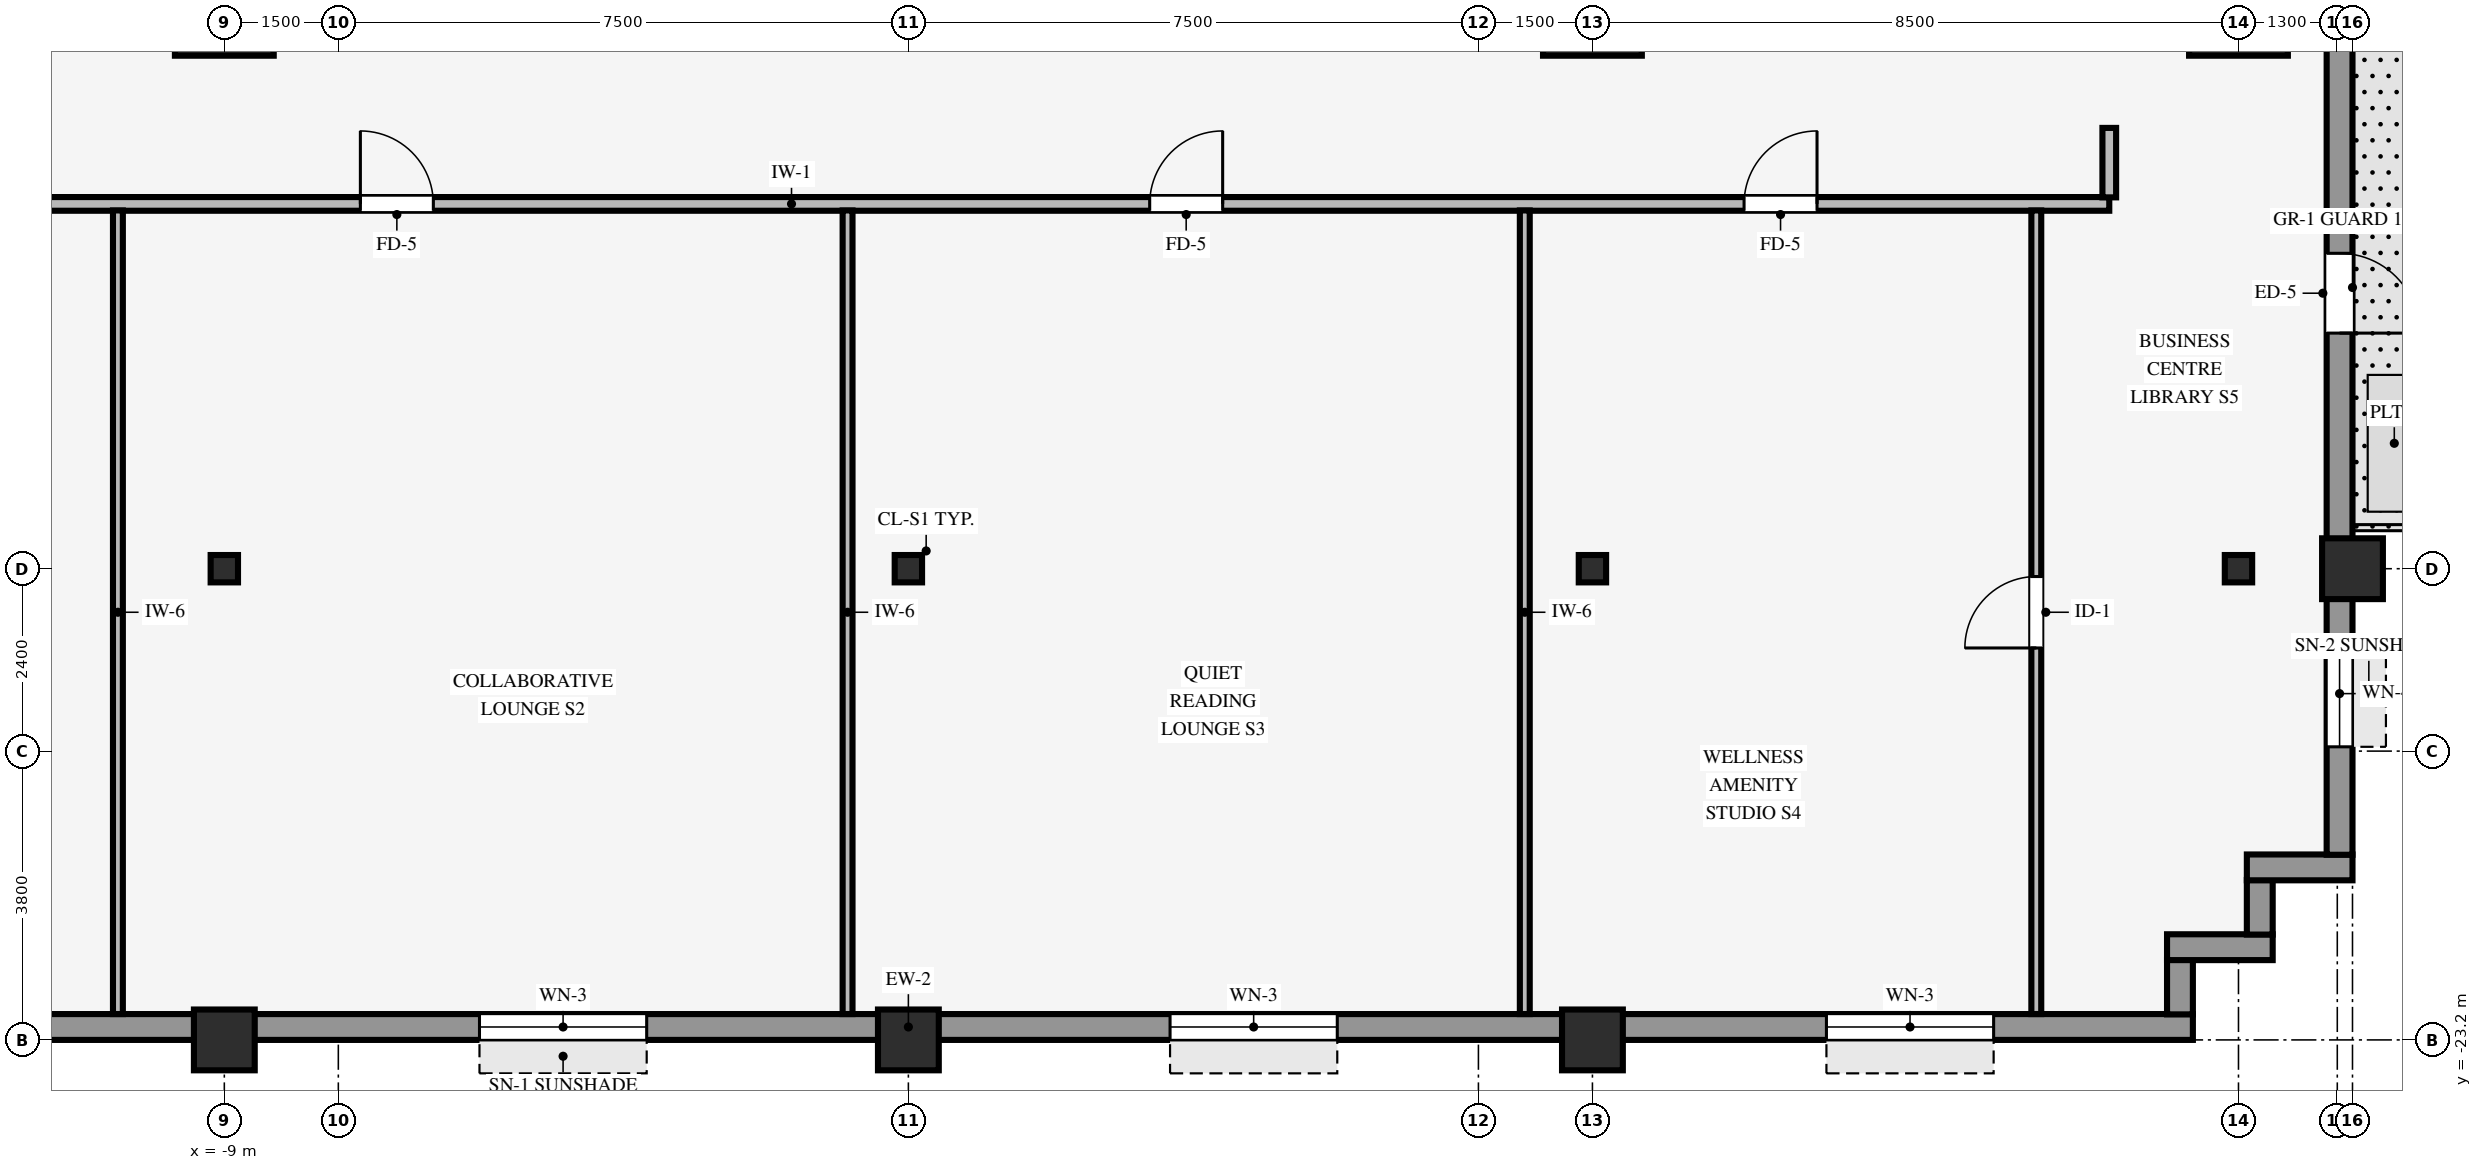
"""IFC4 building model, lengths in metres.
Left out: names, types, materials, properties, quantities, classifications, styles, units other than length and angle.
Written with IfcOpenShell. Run it as: python <this file> out.ifc"""

import sys

from ifc_helpers import new_model, si_unit, direction, frame, frame_2d, origin, origin_2d, place, context, subcontext, project, spatial, rectangle, hollow_rectangle, i_section, extrude, source, transform, mapped, element, fill, save


model = new_model("IFC4")
c1 = context("Model", 3, precision=1e-05, world=origin(), true_north=direction((0.0, 1.0)))
c2 = subcontext(c1, "Body", "Model", "MODEL_VIEW")
j1 = project(units=[si_unit("LENGTHUNIT", "METRE"), si_unit("PLANEANGLEUNIT", "RADIAN")], contexts=[c1])
p1 = place(None, origin())
s1 = spatial("IfcSite", under=j1, at=p1, CompositionType="ELEMENT")
p2 = place(p1, origin())
s2 = spatial("IfcBuilding", under=s1, at=p2, CompositionType="ELEMENT")
p3 = place(p2, frame((0.0, 0.0, 42.2)))
s3 = spatial("IfcBuildingStorey", under=s2, at=p3, CompositionType="ELEMENT", Elevation=42.2)
for number, where, z_axis, x_axis in (
    (1, (-9.0, -9.6, 0.0), (0.0, 0.0, 1.0), (1.0, 0.0, 0.0)),
    (2, (9.0, -9.6, 0.0), (0.0, 0.0, 1.0), (1.0, 0.0, 0.0)),
    (3, (17.5, -9.6, 0.0), (0.0, 0.0, 1.0), (1.0, 0.0, 0.0)),
):
    element("IfcColumn", number, at=place(p3, frame(where, z_axis=z_axis, x_axis=x_axis)), inside=s3, PredefinedType="COLUMN", context=c2, shape_type="SweptSolid", body=[
        extrude(rectangle(XDim=1.3, YDim=1.3, at=origin_2d()), origin(), (0.0, 0.0, 1.0), 3.37),
    ])
for number, where, z_axis, x_axis in (
    (4, (19.0, -17.0, 0.0), (0.0, 0.0, 1.0), (1.0, 0.0, 0.0)),
    (5, (-9.0, -23.2, 0.0), (0.0, 0.0, 1.0), (1.0, 0.0, 0.0)),
    (6, (0.0, -23.2, 0.0), (0.0, 0.0, 1.0), (1.0, 0.0, 0.0)),
    (7, (9.0, -23.2, 0.0), (0.0, 0.0, 1.0), (1.0, 0.0, 0.0)),
):
    element("IfcColumn", number, at=place(p3, frame(where, z_axis=z_axis, x_axis=x_axis)), inside=s3, PredefinedType="COLUMN", context=c2, shape_type="SweptSolid", body=[
        extrude(hollow_rectangle(XDim=0.8, YDim=0.8, WallThickness=0.055, InnerFilletRadius=0.055, OuterFilletRadius=0.11, at=origin_2d()), origin(), (0.0, 0.0, 1.0), 3.37),
    ])
for number, where, z_axis, x_axis in (
    (8, (0.0, -17.0, 0.0), (0.0, 0.0, 1.0), (1.0, 0.0, 0.0)),
    (9, (-9.0, -17.0, 0.0), (0.0, 0.0, 1.0), (1.0, 0.0, 0.0)),
    (10, (9.0, -17.0, 0.0), (0.0, 0.0, 1.0), (1.0, 0.0, 0.0)),
    (11, (17.5, -17.0, 0.0), (0.0, 0.0, 1.0), (1.0, 0.0, 0.0)),
):
    element("IfcColumn", number, at=place(p3, frame(where, z_axis=z_axis, x_axis=x_axis)), inside=s3, PredefinedType="COLUMN", context=c2, shape_type="SweptSolid", body=[
        extrude(i_section(OverallWidth=0.36, OverallDepth=0.36, WebThickness=0.021, FlangeThickness=0.021, FilletRadius=0.018, at=origin_2d()), origin(), (0.0, 0.0, 1.0), 3.37),
    ])
p4 = place(p3, frame((-16.9, -23.03, 0.0), z_axis=(0.0, 0.0, 1.0), x_axis=(1.0, 0.0, 0.0)))
e12 = element("IfcWall", 12, at=p4, inside=s3, PredefinedType="STANDARD", context=c2, shape_type="SweptSolid", body=[
    extrude(rectangle(XDim=33.8, YDim=0.34, at=frame_2d((16.9, 0.0))), origin(), (0.0, 0.0, 1.0), 2.705),
])
p5 = place(p4, frame((2.171, 0.0, 0.8)))
e13 = element("IfcOpeningElement", 13, at=p5, cuts=e12, PredefinedType="OPENING", context=c2, shape_type="SweptSolid", body=[
    extrude(rectangle(XDim=2.2, YDim=1.65, at=frame_2d((1.1, 0.825))), frame((0.0, 0.18, 0.0), z_axis=(0.0, -1.0, 0.0), x_axis=(1.0, 0.0, 0.0)), (0.0, 0.0, 1.0), 0.36),
])
p6 = place(p4, frame((11.257, 0.0, 0.8)))
e14 = element("IfcOpeningElement", 14, at=p6, cuts=e12, PredefinedType="OPENING", context=c2, shape_type="SweptSolid", body=[
    extrude(rectangle(XDim=2.2, YDim=1.65, at=frame_2d((1.1, 0.825))), frame((0.0, 0.18, 0.0), z_axis=(0.0, -1.0, 0.0), x_axis=(1.0, 0.0, 0.0)), (0.0, 0.0, 1.0), 0.36),
])
p7 = place(p4, frame((20.343, 0.0, 0.8)))
e15 = element("IfcOpeningElement", 15, at=p7, cuts=e12, PredefinedType="OPENING", context=c2, shape_type="SweptSolid", body=[
    extrude(rectangle(XDim=2.2, YDim=1.65, at=frame_2d((1.1, 0.825))), frame((0.0, 0.18, 0.0), z_axis=(0.0, -1.0, 0.0), x_axis=(1.0, 0.0, 0.0)), (0.0, 0.0, 1.0), 0.36),
])
p8 = place(p4, frame((28.979, 0.0, 0.8)))
e16 = element("IfcOpeningElement", 16, at=p8, cuts=e12, PredefinedType="OPENING", context=c2, shape_type="SweptSolid", body=[
    extrude(rectangle(XDim=2.2, YDim=1.65, at=frame_2d((1.1, 0.825))), frame((0.0, 0.18, 0.0), z_axis=(0.0, -1.0, 0.0), x_axis=(1.0, 0.0, 0.0)), (0.0, 0.0, 1.0), 0.36),
])
p9 = place(p3, frame((16.73, -22.864, 0.0), z_axis=(0.0, 0.0, 1.0), x_axis=(0.0, 1.0, 0.0)))
e17 = element("IfcWall", 17, at=p9, inside=s3, PredefinedType="STANDARD", context=c2, shape_type="SweptSolid", body=[
    extrude(rectangle(XDim=0.718, YDim=0.34, at=frame_2d((0.359, 0.0))), origin(), (0.0, 0.0, 1.0), 3.36),
])
p10 = place(p3, frame((16.56, -21.98, 0.0), z_axis=(0.0, 0.0, 1.0), x_axis=(1.0, 0.0, 0.0)))
e18 = element("IfcWall", 18, at=p10, inside=s3, PredefinedType="STANDARD", context=c2, shape_type="SweptSolid", body=[
    extrude(rectangle(XDim=1.39, YDim=0.34, at=frame_2d((0.695, 0.0))), origin(), (0.0, 0.0, 1.0), 3.36),
])
p11 = place(p3, frame((17.78, -21.814, 0.0), z_axis=(0.0, 0.0, 1.0), x_axis=(0.0, 1.0, 0.0)))
e19 = element("IfcWall", 19, at=p11, inside=s3, PredefinedType="STANDARD", context=c2, shape_type="SweptSolid", body=[
    extrude(rectangle(XDim=0.718, YDim=0.34, at=frame_2d((0.359, 0.0))), origin(), (0.0, 0.0, 1.0), 3.36),
])
p12 = place(p3, frame((17.61, -20.93, 0.0), z_axis=(0.0, 0.0, 1.0), x_axis=(1.0, 0.0, 0.0)))
e20 = element("IfcWall", 20, at=p12, inside=s3, PredefinedType="STANDARD", context=c2, shape_type="SweptSolid", body=[
    extrude(rectangle(XDim=1.39, YDim=0.34, at=frame_2d((0.695, 0.0))), origin(), (0.0, 0.0, 1.0), 3.36),
])
p13 = place(p3, frame((18.83, -20.764, 0.0), z_axis=(0.0, 0.0, 1.0), x_axis=(0.0, 1.0, 0.0)))
e21 = element("IfcWall", 21, at=p13, inside=s3, PredefinedType="STANDARD", context=c2, shape_type="SweptSolid", body=[
    extrude(rectangle(XDim=41.528, YDim=0.34, at=frame_2d((20.764, 0.0))), origin(), (0.0, 0.0, 1.0), 2.705),
])
p14 = place(p13, frame((7.914, 0.0, 0.0), z_axis=(0.0, 0.0, 1.0), x_axis=(-1.0, 0.0, 0.0)))
e22 = element("IfcOpeningElement", 22, at=p14, cuts=e21, PredefinedType="OPENING", context=c2, shape_type="SweptSolid", body=[
    extrude(rectangle(XDim=1.05, YDim=2.1, at=frame_2d((0.525, 1.05))), frame((0.0, 0.18, 0.0), z_axis=(0.0, -1.0, 0.0), x_axis=(1.0, 0.0, 0.0)), (0.0, 0.0, 1.0), 0.36),
])
p15 = place(p13, frame((1.42, 0.0, 0.8)))
e23 = element("IfcOpeningElement", 23, at=p15, cuts=e21, PredefinedType="OPENING", context=c2, shape_type="SweptSolid", body=[
    extrude(rectangle(XDim=1.4, YDim=1.65, at=frame_2d((0.7, 0.825))), frame((0.0, 0.18, 0.0), z_axis=(0.0, -1.0, 0.0), x_axis=(1.0, 0.0, 0.0)), (0.0, 0.0, 1.0), 0.36),
])
p16 = place(p13, frame((32.417, 0.0, 0.8)))
e24 = element("IfcOpeningElement", 24, at=p16, cuts=e21, PredefinedType="OPENING", context=c2, shape_type="SweptSolid", body=[
    extrude(rectangle(XDim=1.4, YDim=1.65, at=frame_2d((0.7, 0.825))), frame((0.0, 0.18, 0.0), z_axis=(0.0, -1.0, 0.0), x_axis=(1.0, 0.0, 0.0)), (0.0, 0.0, 1.0), 0.36),
])
p17 = place(p13, frame((38.708, 0.0, 0.8)))
e25 = element("IfcOpeningElement", 25, at=p17, cuts=e21, PredefinedType="OPENING", context=c2, shape_type="SweptSolid", body=[
    extrude(rectangle(XDim=1.4, YDim=1.65, at=frame_2d((0.7, 0.825))), frame((0.0, 0.18, 0.0), z_axis=(0.0, -1.0, 0.0), x_axis=(1.0, 0.0, 0.0)), (0.0, 0.0, 1.0), 0.36),
])
p18 = place(p3, frame((-15.8, -12.2, 0.0), z_axis=(0.0, 0.0, 1.0), x_axis=(1.0, 0.0, 0.0)))
e26 = element("IfcWall", 26, at=p18, inside=s3, PredefinedType="PARTITIONING", context=c2, shape_type="SweptSolid", body=[
    extrude(rectangle(XDim=31.6, YDim=0.18, at=frame_2d((15.8, 0.0))), origin(), (0.0, 0.0, 1.0), 3.36),
])
p19 = place(p18, frame((18.975, 0.0, 0.0)))
e27 = element("IfcOpeningElement", 27, at=p19, cuts=e26, PredefinedType="OPENING", context=c2, shape_type="SweptSolid", body=[
    extrude(rectangle(XDim=0.96, YDim=2.1, at=frame_2d((0.48, 1.05))), frame((0.0, 0.1, 0.0), z_axis=(0.0, -1.0, 0.0), x_axis=(1.0, 0.0, 0.0)), (0.0, 0.0, 1.0), 0.2),
])
p20 = place(p18, frame((8.59, 0.0, 0.0)))
e28 = element("IfcOpeningElement", 28, at=p20, cuts=e26, PredefinedType="OPENING", context=c2, shape_type="SweptSolid", body=[
    extrude(rectangle(XDim=0.96, YDim=2.1, at=frame_2d((0.48, 1.05))), frame((0.0, 0.1, 0.0), z_axis=(0.0, -1.0, 0.0), x_axis=(1.0, 0.0, 0.0)), (0.0, 0.0, 1.0), 0.2),
])
p21 = place(p18, frame((26.795, 0.0, 0.0)))
e29 = element("IfcOpeningElement", 29, at=p21, cuts=e26, PredefinedType="OPENING", context=c2, shape_type="SweptSolid", body=[
    extrude(rectangle(XDim=0.96, YDim=2.1, at=frame_2d((0.48, 1.05))), frame((0.0, 0.1, 0.0), z_axis=(0.0, -1.0, 0.0), x_axis=(1.0, 0.0, 0.0)), (0.0, 0.0, 1.0), 0.2),
])
p22 = place(p18, frame((2.29, 0.0, 0.0)))
e30 = element("IfcOpeningElement", 30, at=p22, cuts=e26, PredefinedType="OPENING", context=c2, shape_type="SweptSolid", body=[
    extrude(rectangle(XDim=0.96, YDim=2.1, at=frame_2d((0.48, 1.05))), frame((0.0, 0.1, 0.0), z_axis=(0.0, -1.0, 0.0), x_axis=(1.0, 0.0, 0.0)), (0.0, 0.0, 1.0), 0.2),
])
for number, where, z_axis, x_axis in (
    (31, (-10.4, -22.86, 0.0), (0.0, 0.0, 1.0), (0.0, 1.0, 0.0)),
    (32, (-0.8, -22.86, 0.0), (0.0, 0.0, 1.0), (0.0, 1.0, 0.0)),
    (33, (8.11, -22.86, 0.0), (0.0, 0.0, 1.0), (0.0, 1.0, 0.0)),
):
    element("IfcWall", number, at=place(p3, frame(where, z_axis=z_axis, x_axis=x_axis)), inside=s3, PredefinedType="PARTITIONING", context=c2, shape_type="SweptSolid", body=[
        extrude(rectangle(XDim=10.574, YDim=0.13, at=frame_2d((5.287, 0.0))), origin(), (0.0, 0.0, 1.0), 3.36),
    ])
p23 = place(p3, frame((14.84, -22.86, 0.0), z_axis=(0.0, 0.0, 1.0), x_axis=(0.0, 1.0, 0.0)))
e34 = element("IfcWall", 34, at=p23, inside=s3, PredefinedType="PARTITIONING", context=c2, shape_type="SweptSolid", body=[
    extrude(rectangle(XDim=10.574, YDim=0.13, at=frame_2d((5.287, 0.0))), origin(), (0.0, 0.0, 1.0), 3.36),
])
p24 = place(p23, frame((4.817, 0.0, 0.0)))
e35 = element("IfcOpeningElement", 35, at=p24, cuts=e34, PredefinedType="OPENING", context=c2, shape_type="SweptSolid", body=[
    extrude(rectangle(XDim=0.94, YDim=2.1, at=frame_2d((0.47, 1.05))), frame((0.0, 0.075, 0.0), z_axis=(0.0, -1.0, 0.0), x_axis=(1.0, 0.0, 0.0)), (0.0, 0.0, 1.0), 0.15),
])
p25 = place(p3, frame((15.8, -12.114, 0.0), z_axis=(0.0, 0.0, 1.0), x_axis=(0.0, 1.0, 0.0)))
e36 = element("IfcWall", 36, at=p25, inside=s3, PredefinedType="PARTITIONING", context=c2, shape_type="SweptSolid", body=[
    extrude(rectangle(XDim=0.914, YDim=0.18, at=frame_2d((0.457, 0.0))), origin(), (0.0, 0.0, 1.0), 3.36),
])
m1 = source(origin(), c2, "Body", "SweptSolid", [
    extrude(rectangle(XDim=2.2, YDim=1.65, at=frame_2d((1.1, 0.825))), frame((0.0, 0.03, 0.0), z_axis=(0.0, -1.0, 0.0), x_axis=(1.0, 0.0, 0.0)), (0.0, 0.0, 1.0), 0.06),
])
p26 = place(p6, origin())
e37 = element("IfcWindow", 37, at=p26, inside=s3, PartitioningType="SINGLE_PANEL", PredefinedType="WINDOW", context=c2, shape_type="MappedRepresentation", body=[
    mapped(m1, transform((0.0, 0.0, 0.0), scale=1.0)),
])
fill(e14, e37)
p27 = place(p7, origin())
e38 = element("IfcWindow", 38, at=p27, inside=s3, PartitioningType="SINGLE_PANEL", PredefinedType="WINDOW", context=c2, shape_type="MappedRepresentation", body=[
    mapped(m1, transform((0.0, 0.0, 0.0), scale=1.0)),
])
fill(e15, e38)
p28 = place(p8, origin())
e39 = element("IfcWindow", 39, at=p28, inside=s3, PartitioningType="SINGLE_PANEL", PredefinedType="WINDOW", context=c2, shape_type="MappedRepresentation", body=[
    mapped(m1, transform((0.0, 0.0, 0.0), scale=1.0)),
])
fill(e16, e39)
m2 = source(origin(), c2, "Body", "SweptSolid", [
    extrude(rectangle(XDim=1.05, YDim=2.1, at=frame_2d((0.525, 1.05))), frame((0.0, 0.025, 0.0), z_axis=(0.0, -1.0, 0.0), x_axis=(1.0, 0.0, 0.0)), (0.0, 0.0, 1.0), 0.05),
])
p29 = place(p14, origin())
e40 = element("IfcDoor", 40, at=p29, inside=s3, OperationType="SINGLE_SWING_RIGHT", PredefinedType="DOOR", context=c2, shape_type="MappedRepresentation", body=[
    mapped(m2, transform((0.0, 0.0, 0.0), scale=1.0)),
])
fill(e22, e40)
m3 = source(origin(), c2, "Body", "SweptSolid", [
    extrude(rectangle(XDim=1.4, YDim=1.65, at=frame_2d((0.7, 0.825))), frame((0.0, 0.03, 0.0), z_axis=(0.0, -1.0, 0.0), x_axis=(1.0, 0.0, 0.0)), (0.0, 0.0, 1.0), 0.06),
])
p30 = place(p15, origin())
e41 = element("IfcWindow", 41, at=p30, inside=s3, PartitioningType="SINGLE_PANEL", PredefinedType="WINDOW", context=c2, shape_type="MappedRepresentation", body=[
    mapped(m3, transform((0.0, 0.0, 0.0), scale=1.0)),
])
fill(e23, e41)
m4 = source(origin(), c2, "Body", "SweptSolid", [
    extrude(rectangle(XDim=0.96, YDim=2.1, at=frame_2d((0.48, 1.05))), frame((0.0, 0.025, 0.0), z_axis=(0.0, -1.0, 0.0), x_axis=(1.0, 0.0, 0.0)), (0.0, 0.0, 1.0), 0.05),
])
p31 = place(p19, origin())
e42 = element("IfcDoor", 42, at=p31, inside=s3, OperationType="SINGLE_SWING_RIGHT", PredefinedType="DOOR", context=c2, shape_type="MappedRepresentation", body=[
    mapped(m4, transform((0.0, 0.0, 0.0), scale=1.0)),
])
fill(e27, e42)
p32 = place(p20, origin())
e43 = element("IfcDoor", 43, at=p32, inside=s3, OperationType="SINGLE_SWING_LEFT", PredefinedType="DOOR", context=c2, shape_type="MappedRepresentation", body=[
    mapped(m4, transform((0.0, 0.0, 0.0), scale=1.0)),
])
fill(e28, e43)
p33 = place(p21, origin())
e44 = element("IfcDoor", 44, at=p33, inside=s3, OperationType="SINGLE_SWING_RIGHT", PredefinedType="DOOR", context=c2, shape_type="MappedRepresentation", body=[
    mapped(m4, transform((0.0, 0.0, 0.0), scale=1.0)),
])
fill(e29, e44)
m5 = source(origin(), c2, "Body", "SweptSolid", [
    extrude(rectangle(XDim=0.94, YDim=2.1, at=frame_2d((0.47, 1.05))), frame((0.0, 0.025, 0.0), z_axis=(0.0, -1.0, 0.0), x_axis=(1.0, 0.0, 0.0)), (0.0, 0.0, 1.0), 0.05),
])
p34 = place(p24, origin())
e45 = element("IfcDoor", 45, at=p34, inside=s3, OperationType="SINGLE_SWING_LEFT", PredefinedType="DOOR", context=c2, shape_type="MappedRepresentation", body=[
    mapped(m5, transform((0.0, 0.0, 0.0), scale=1.0)),
])
fill(e35, e45)
save(model, sys.argv[1])
